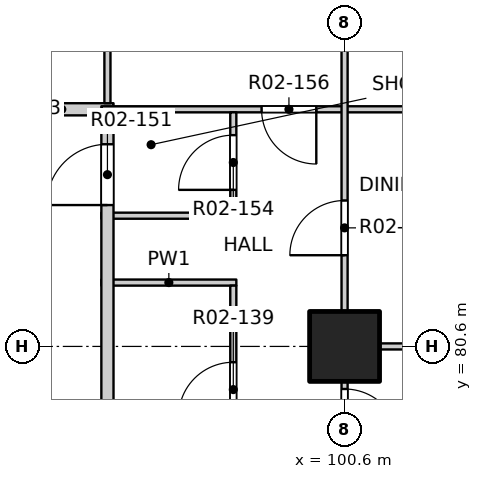
"""IFC4 building model, lengths in metres.
Left out: names, types, materials, properties, quantities, classifications, styles, units other than length and angle.
Written with IfcOpenShell. Run it as: python <this file> out.ifc"""

import sys

from ifc_helpers import new_model, si_unit, direction, frame, frame_2d, origin, origin_2d, place, context, subcontext, project, spatial, rectangle, extrude, element, fill, save


model = new_model("IFC4")
c1 = context("Model", 3, precision=1e-05, world=origin(), true_north=direction((0.0, 1.0)))
c2 = subcontext(c1, "Body", "Model", "MODEL_VIEW")
j1 = project(units=[si_unit("LENGTHUNIT", "METRE"), si_unit("PLANEANGLEUNIT", "RADIAN")], contexts=[c1])
p1 = place(None, origin())
s1 = spatial("IfcSite", under=j1, at=p1, CompositionType="ELEMENT")
p2 = place(p1, origin())
s2 = spatial("IfcBuilding", under=s1, at=p2, CompositionType="ELEMENT")
p3 = place(p2, frame((0.0, 0.0, 29.7)))
s3 = spatial("IfcBuildingStorey", under=s2, at=p3, CompositionType="ELEMENT", Elevation=29.7)
p4 = place(p3, frame((100.6, 80.6, -0.25), z_axis=(0.0, 0.0, 1.0), x_axis=(1.0, 0.0, 0.0)))
e1 = element("IfcColumn", 1, at=p4, inside=s3, PredefinedType="COLUMN", context=c2, shape_type="SweptSolid", body=[
    extrude(rectangle(XDim=1.15, YDim=1.15, at=origin_2d()), origin(), (0.0, 0.0, 1.0), 3.4),
])
p5 = place(p3, frame((100.55, 80.6, 0.0), z_axis=(0.0, 0.0, 1.0), x_axis=(1.0, 0.0, 0.0)))
e2 = element("IfcWall", 2, at=p5, inside=s3, PredefinedType="PARTITIONING", context=c2, shape_type="SweptSolid", body=[
    extrude(rectangle(XDim=7.55, YDim=0.1, at=frame_2d((3.775, 0.0))), origin(), (0.0, 0.0, 1.0), 2.55),
])
for number, where, z_axis, x_axis in (
    (3, (96.6, 81.65, 0.0), (0.0, 0.0, 1.0), (1.0, 0.0, 0.0)),
    (4, (96.6, 82.75, 0.0), (0.0, 0.0, 1.0), (1.0, 0.0, 0.0)),
):
    element("IfcWall", number, at=place(p3, frame(where, z_axis=z_axis, x_axis=x_axis)), inside=s3, PredefinedType="PARTITIONING", context=c2, shape_type="SweptSolid", body=[
        extrude(rectangle(XDim=2.22, YDim=0.1, at=frame_2d((1.11, 0.0))), origin(), (0.0, 0.0, 1.0), 3.15),
    ])
p6 = place(p3, frame((95.1, 84.5, 0.0), z_axis=(0.0, 0.0, 1.0), x_axis=(1.0, 0.0, 0.0)))
e5 = element("IfcWall", 5, at=p6, inside=s3, PredefinedType="PARTITIONING", context=c2, shape_type="SweptSolid", body=[
    extrude(rectangle(XDim=1.7, YDim=0.2, at=frame_2d((0.85, 0.0))), origin(), (0.0, 0.0, 1.0), 3.15),
])
p7 = place(p3, frame((96.6, 84.5, 0.0), z_axis=(0.0, 0.0, 1.0), x_axis=(1.0, 0.0, 0.0)))
e6 = element("IfcWall", 6, at=p7, inside=s3, PredefinedType="PARTITIONING", context=c2, shape_type="SweptSolid", body=[
    extrude(rectangle(XDim=11.5, YDim=0.1, at=frame_2d((5.75, 0.0))), origin(), (0.0, 0.0, 1.0), 3.15),
])
p8 = place(p7, frame((2.635, 0.0, 0.0)))
e7 = element("IfcOpeningElement", 7, at=p8, cuts=e6, PredefinedType="OPENING", context=c2, shape_type="SweptSolid", body=[
    extrude(rectangle(XDim=0.9, YDim=2.1, at=frame_2d((0.45, 1.05))), frame((0.0, 0.06, 0.0), z_axis=(0.0, -1.0, 0.0), x_axis=(1.0, 0.0, 0.0)), (0.0, 0.0, 1.0), 0.12),
])
p9 = place(p3, frame((96.7, 53.4, 0.0), z_axis=(0.0, 0.0, 1.0), x_axis=(0.0, 1.0, 0.0)))
e8 = element("IfcWall", 8, at=p9, inside=s3, PredefinedType="PARTITIONING", context=c2, shape_type="SweptSolid", body=[
    extrude(rectangle(XDim=31.0, YDim=0.2, at=frame_2d((15.5, 0.0))), origin(), (0.0, 0.0, 1.0), 3.15),
])
p10 = place(p9, frame((2.425, 0.0, 0.0)))
e9 = element("IfcOpeningElement", 9, at=p10, cuts=e8, PredefinedType="OPENING", context=c2, shape_type="SweptSolid", body=[
    extrude(rectangle(XDim=1.0, YDim=2.1, at=frame_2d((0.5, 1.05))), frame((0.0, 0.11, 0.0), z_axis=(0.0, -1.0, 0.0), x_axis=(1.0, 0.0, 0.0)), (0.0, 0.0, 1.0), 0.22),
])
p11 = place(p9, frame((13.375, 0.0, 0.0)))
e10 = element("IfcOpeningElement", 10, at=p11, cuts=e8, PredefinedType="OPENING", context=c2, shape_type="SweptSolid", body=[
    extrude(rectangle(XDim=1.0, YDim=2.1, at=frame_2d((0.5, 1.05))), frame((0.0, 0.11, 0.0), z_axis=(0.0, -1.0, 0.0), x_axis=(1.0, 0.0, 0.0)), (0.0, 0.0, 1.0), 0.22),
])
p12 = place(p9, frame((29.525, 0.0, 0.0)))
e11 = element("IfcOpeningElement", 11, at=p12, cuts=e8, PredefinedType="OPENING", context=c2, shape_type="SweptSolid", body=[
    extrude(rectangle(XDim=1.0, YDim=2.1, at=frame_2d((0.5, 1.05))), frame((0.0, 0.11, 0.0), z_axis=(0.0, -1.0, 0.0), x_axis=(1.0, 0.0, 0.0)), (0.0, 0.0, 1.0), 0.22),
])
p13 = place(p3, frame((96.7, 84.6, 0.0), z_axis=(0.0, 0.0, 1.0), x_axis=(0.0, 1.0, 0.0)))
e12 = element("IfcWall", 12, at=p13, inside=s3, PredefinedType="PARTITIONING", context=c2, shape_type="SweptSolid", body=[
    extrude(rectangle(XDim=3.5, YDim=0.1, at=frame_2d((1.75, 0.0))), origin(), (0.0, 0.0, 1.0), 3.15),
])
p14 = place(p13, frame((1.4, 0.0, 0.0)))
e13 = element("IfcOpeningElement", 13, at=p14, cuts=e12, PredefinedType="OPENING", context=c2, shape_type="SweptSolid", body=[
    extrude(rectangle(XDim=0.9, YDim=2.1, at=frame_2d((0.45, 1.05))), frame((0.0, 0.06, 0.0), z_axis=(0.0, -1.0, 0.0), x_axis=(1.0, 0.0, 0.0)), (0.0, 0.0, 1.0), 0.12),
])
p15 = place(p3, frame((98.77, 66.65, 0.0), z_axis=(0.0, 0.0, 1.0), x_axis=(0.0, 1.0, 0.0)))
e14 = element("IfcWall", 14, at=p15, inside=s3, PredefinedType="PARTITIONING", context=c2, shape_type="SweptSolid", body=[
    extrude(rectangle(XDim=14.95, YDim=0.1, at=frame_2d((7.475, 0.0))), origin(), (0.0, 0.0, 1.0), 3.15),
])
p16 = place(p15, frame((0.925, 0.0, 0.0)))
e15 = element("IfcOpeningElement", 15, at=p16, cuts=e14, PredefinedType="OPENING", context=c2, shape_type="SweptSolid", body=[
    extrude(rectangle(XDim=0.8, YDim=2.1, at=frame_2d((0.4, 1.05))), frame((0.0, 0.06, 0.0), z_axis=(0.0, -1.0, 0.0), x_axis=(1.0, 0.0, 0.0)), (0.0, 0.0, 1.0), 0.12),
])
p17 = place(p15, frame((3.975, 0.0, 0.0)))
e16 = element("IfcOpeningElement", 16, at=p17, cuts=e14, PredefinedType="OPENING", context=c2, shape_type="SweptSolid", body=[
    extrude(rectangle(XDim=0.9, YDim=2.1, at=frame_2d((0.45, 1.05))), frame((0.0, 0.06, 0.0), z_axis=(0.0, -1.0, 0.0), x_axis=(1.0, 0.0, 0.0)), (0.0, 0.0, 1.0), 0.12),
])
p18 = place(p15, frame((6.915, 0.0, 0.0)))
e17 = element("IfcOpeningElement", 17, at=p18, cuts=e14, PredefinedType="OPENING", context=c2, shape_type="SweptSolid", body=[
    extrude(rectangle(XDim=0.9, YDim=2.1, at=frame_2d((0.45, 1.05))), frame((0.0, 0.06, 0.0), z_axis=(0.0, -1.0, 0.0), x_axis=(1.0, 0.0, 0.0)), (0.0, 0.0, 1.0), 0.12),
])
p19 = place(p15, frame((9.63, 0.0, 0.0)))
e18 = element("IfcOpeningElement", 18, at=p19, cuts=e14, PredefinedType="OPENING", context=c2, shape_type="SweptSolid", body=[
    extrude(rectangle(XDim=0.8, YDim=2.1, at=frame_2d((0.4, 1.05))), frame((0.0, 0.06, 0.0), z_axis=(0.0, -1.0, 0.0), x_axis=(1.0, 0.0, 0.0)), (0.0, 0.0, 1.0), 0.12),
])
p20 = place(p15, frame((12.79, 0.0, 0.0)))
e19 = element("IfcOpeningElement", 19, at=p20, cuts=e14, PredefinedType="OPENING", context=c2, shape_type="SweptSolid", body=[
    extrude(rectangle(XDim=0.9, YDim=2.1, at=frame_2d((0.45, 1.05))), frame((0.0, 0.06, 0.0), z_axis=(0.0, -1.0, 0.0), x_axis=(1.0, 0.0, 0.0)), (0.0, 0.0, 1.0), 0.12),
])
p21 = place(p3, frame((98.77, 82.8, 0.0), z_axis=(0.0, 0.0, 1.0), x_axis=(0.0, 1.0, 0.0)))
e20 = element("IfcWall", 20, at=p21, inside=s3, PredefinedType="PARTITIONING", context=c2, shape_type="SweptSolid", body=[
    extrude(rectangle(XDim=1.65, YDim=0.1, at=frame_2d((0.825, 0.0))), origin(), (0.0, 0.0, 1.0), 3.15),
])
p22 = place(p21, frame((0.375, 0.0, 0.0)))
e21 = element("IfcOpeningElement", 21, at=p22, cuts=e20, PredefinedType="OPENING", context=c2, shape_type="SweptSolid", body=[
    extrude(rectangle(XDim=0.9, YDim=2.1, at=frame_2d((0.45, 1.05))), frame((0.0, 0.06, 0.0), z_axis=(0.0, -1.0, 0.0), x_axis=(1.0, 0.0, 0.0)), (0.0, 0.0, 1.0), 0.12),
])
p23 = place(p3, frame((100.6, 49.4, 0.0), z_axis=(0.0, 0.0, 1.0), x_axis=(0.0, 1.0, 0.0)))
e22 = element("IfcWall", 22, at=p23, inside=s3, PredefinedType="PARTITIONING", context=c2, shape_type="SweptSolid", body=[
    extrude(rectangle(XDim=31.2, YDim=0.1, at=frame_2d((15.6, 0.0))), origin(), (0.0, 0.0, 1.0), 3.15),
])
p24 = place(p23, frame((2.475, 0.0, 0.0)))
e23 = element("IfcOpeningElement", 23, at=p24, cuts=e22, PredefinedType="OPENING", context=c2, shape_type="SweptSolid", body=[
    extrude(rectangle(XDim=0.9, YDim=2.1, at=frame_2d((0.45, 1.05))), frame((0.0, 0.06, 0.0), z_axis=(0.0, -1.0, 0.0), x_axis=(1.0, 0.0, 0.0)), (0.0, 0.0, 1.0), 0.12),
])
p25 = place(p23, frame((5.4, 0.0, 0.0)))
e24 = element("IfcOpeningElement", 24, at=p25, cuts=e22, PredefinedType="OPENING", context=c2, shape_type="SweptSolid", body=[
    extrude(rectangle(XDim=0.9, YDim=2.1, at=frame_2d((0.45, 1.05))), frame((0.0, 0.06, 0.0), z_axis=(0.0, -1.0, 0.0), x_axis=(1.0, 0.0, 0.0)), (0.0, 0.0, 1.0), 0.12),
])
p26 = place(p23, frame((10.275, 0.0, 0.0)))
e25 = element("IfcOpeningElement", 25, at=p26, cuts=e22, PredefinedType="OPENING", context=c2, shape_type="SweptSolid", body=[
    extrude(rectangle(XDim=0.9, YDim=2.1, at=frame_2d((0.45, 1.05))), frame((0.0, 0.06, 0.0), z_axis=(0.0, -1.0, 0.0), x_axis=(1.0, 0.0, 0.0)), (0.0, 0.0, 1.0), 0.12),
])
p27 = place(p23, frame((14.0, 0.0, 0.0)))
e26 = element("IfcOpeningElement", 26, at=p27, cuts=e22, PredefinedType="OPENING", context=c2, shape_type="SweptSolid", body=[
    extrude(rectangle(XDim=0.9, YDim=2.1, at=frame_2d((0.45, 1.05))), frame((0.0, 0.06, 0.0), z_axis=(0.0, -1.0, 0.0), x_axis=(1.0, 0.0, 0.0)), (0.0, 0.0, 1.0), 0.12),
])
p28 = place(p23, frame((17.1, 0.0, 0.0)))
e27 = element("IfcOpeningElement", 27, at=p28, cuts=e22, PredefinedType="OPENING", context=c2, shape_type="SweptSolid", body=[
    extrude(rectangle(XDim=0.9, YDim=2.1, at=frame_2d((0.45, 1.05))), frame((0.0, 0.06, 0.0), z_axis=(0.0, -1.0, 0.0), x_axis=(1.0, 0.0, 0.0)), (0.0, 0.0, 1.0), 0.12),
])
p29 = place(p23, frame((21.0, 0.0, 0.0)))
e28 = element("IfcOpeningElement", 28, at=p29, cuts=e22, PredefinedType="OPENING", context=c2, shape_type="SweptSolid", body=[
    extrude(rectangle(XDim=0.9, YDim=2.1, at=frame_2d((0.45, 1.05))), frame((0.0, 0.06, 0.0), z_axis=(0.0, -1.0, 0.0), x_axis=(1.0, 0.0, 0.0)), (0.0, 0.0, 1.0), 0.12),
])
p30 = place(p23, frame((25.875, 0.0, 0.0)))
e29 = element("IfcOpeningElement", 29, at=p30, cuts=e22, PredefinedType="OPENING", context=c2, shape_type="SweptSolid", body=[
    extrude(rectangle(XDim=0.9, YDim=2.1, at=frame_2d((0.45, 1.05))), frame((0.0, 0.06, 0.0), z_axis=(0.0, -1.0, 0.0), x_axis=(1.0, 0.0, 0.0)), (0.0, 0.0, 1.0), 0.12),
])
p31 = place(p23, frame((29.6, 0.0, 0.0)))
e30 = element("IfcOpeningElement", 30, at=p31, cuts=e22, PredefinedType="OPENING", context=c2, shape_type="SweptSolid", body=[
    extrude(rectangle(XDim=0.9, YDim=2.1, at=frame_2d((0.45, 1.05))), frame((0.0, 0.06, 0.0), z_axis=(0.0, -1.0, 0.0), x_axis=(1.0, 0.0, 0.0)), (0.0, 0.0, 1.0), 0.12),
])
p32 = place(p3, frame((100.6, 80.6, 0.0), z_axis=(0.0, 0.0, 1.0), x_axis=(0.0, 1.0, 0.0)))
e31 = element("IfcWall", 31, at=p32, inside=s3, PredefinedType="PARTITIONING", context=c2, shape_type="SweptSolid", body=[
    extrude(rectangle(XDim=7.5, YDim=0.1, at=frame_2d((3.75, 0.0))), origin(), (0.0, 0.0, 1.0), 2.55),
])
p33 = place(p32, frame((1.5, 0.0, 0.0)))
e32 = element("IfcOpeningElement", 32, at=p33, cuts=e31, PredefinedType="OPENING", context=c2, shape_type="SweptSolid", body=[
    extrude(rectangle(XDim=0.9, YDim=2.1, at=frame_2d((0.45, 1.05))), frame((0.0, 0.06, 0.0), z_axis=(0.0, -1.0, 0.0), x_axis=(1.0, 0.0, 0.0)), (0.0, 0.0, 1.0), 0.12),
])
p34 = place(p32, frame((5.4, 0.0, 0.0)))
e33 = element("IfcOpeningElement", 33, at=p34, cuts=e31, PredefinedType="OPENING", context=c2, shape_type="SweptSolid", body=[
    extrude(rectangle(XDim=0.9, YDim=2.1, at=frame_2d((0.45, 1.05))), frame((0.0, 0.06, 0.0), z_axis=(0.0, -1.0, 0.0), x_axis=(1.0, 0.0, 0.0)), (0.0, 0.0, 1.0), 0.12),
])
p35 = place(p31, origin())
e34 = element("IfcDoor", 34, at=p35, inside=s3, OperationType="SINGLE_SWING_RIGHT", PredefinedType="DOOR", context=c2, shape_type="SweptSolid", body=[
    extrude(rectangle(XDim=0.9, YDim=2.1, at=frame_2d((0.45, 1.05))), frame((0.0, 0.025, 0.0), z_axis=(0.0, -1.0, 0.0), x_axis=(1.0, 0.0, 0.0)), (0.0, 0.0, 1.0), 0.05),
])
fill(e30, e34)
p36 = place(p20, origin())
e35 = element("IfcDoor", 35, at=p36, inside=s3, OperationType="SINGLE_SWING_LEFT", PredefinedType="DOOR", context=c2, shape_type="SweptSolid", body=[
    extrude(rectangle(XDim=0.9, YDim=2.1, at=frame_2d((0.45, 1.05))), frame((0.0, 0.025, 0.0), z_axis=(0.0, -1.0, 0.0), x_axis=(1.0, 0.0, 0.0)), (0.0, 0.0, 1.0), 0.05),
])
fill(e19, e35)
p37 = place(p33, origin())
e36 = element("IfcDoor", 36, at=p37, inside=s3, OperationType="SINGLE_SWING_LEFT", PredefinedType="DOOR", context=c2, shape_type="SweptSolid", body=[
    extrude(rectangle(XDim=0.9, YDim=2.1, at=frame_2d((0.45, 1.05))), frame((0.0, 0.025, 0.0), z_axis=(0.0, -1.0, 0.0), x_axis=(1.0, 0.0, 0.0)), (0.0, 0.0, 1.0), 0.05),
])
fill(e32, e36)
p38 = place(p12, origin())
e37 = element("IfcDoor", 37, at=p38, inside=s3, OperationType="SINGLE_SWING_LEFT", PredefinedType="DOOR", context=c2, shape_type="SweptSolid", body=[
    extrude(rectangle(XDim=1.0, YDim=2.1, at=frame_2d((0.5, 1.05))), frame((0.0, 0.025, 0.0), z_axis=(0.0, -1.0, 0.0), x_axis=(1.0, 0.0, 0.0)), (0.0, 0.0, 1.0), 0.05),
])
fill(e11, e37)
p39 = place(p22, origin())
e38 = element("IfcDoor", 38, at=p39, inside=s3, OperationType="SINGLE_SWING_LEFT", PredefinedType="DOOR", context=c2, shape_type="SweptSolid", body=[
    extrude(rectangle(XDim=0.9, YDim=2.1, at=frame_2d((0.45, 1.05))), frame((0.0, 0.025, 0.0), z_axis=(0.0, -1.0, 0.0), x_axis=(1.0, 0.0, 0.0)), (0.0, 0.0, 1.0), 0.05),
])
fill(e21, e38)
p40 = place(p8, origin())
e39 = element("IfcDoor", 39, at=p40, inside=s3, OperationType="SINGLE_SWING_LEFT", PredefinedType="DOOR", context=c2, shape_type="SweptSolid", body=[
    extrude(rectangle(XDim=0.9, YDim=2.1, at=frame_2d((0.45, 1.05))), frame((0.0, 0.025, 0.0), z_axis=(0.0, -1.0, 0.0), x_axis=(1.0, 0.0, 0.0)), (0.0, 0.0, 1.0), 0.05),
])
fill(e7, e39)
save(model, sys.argv[1])
